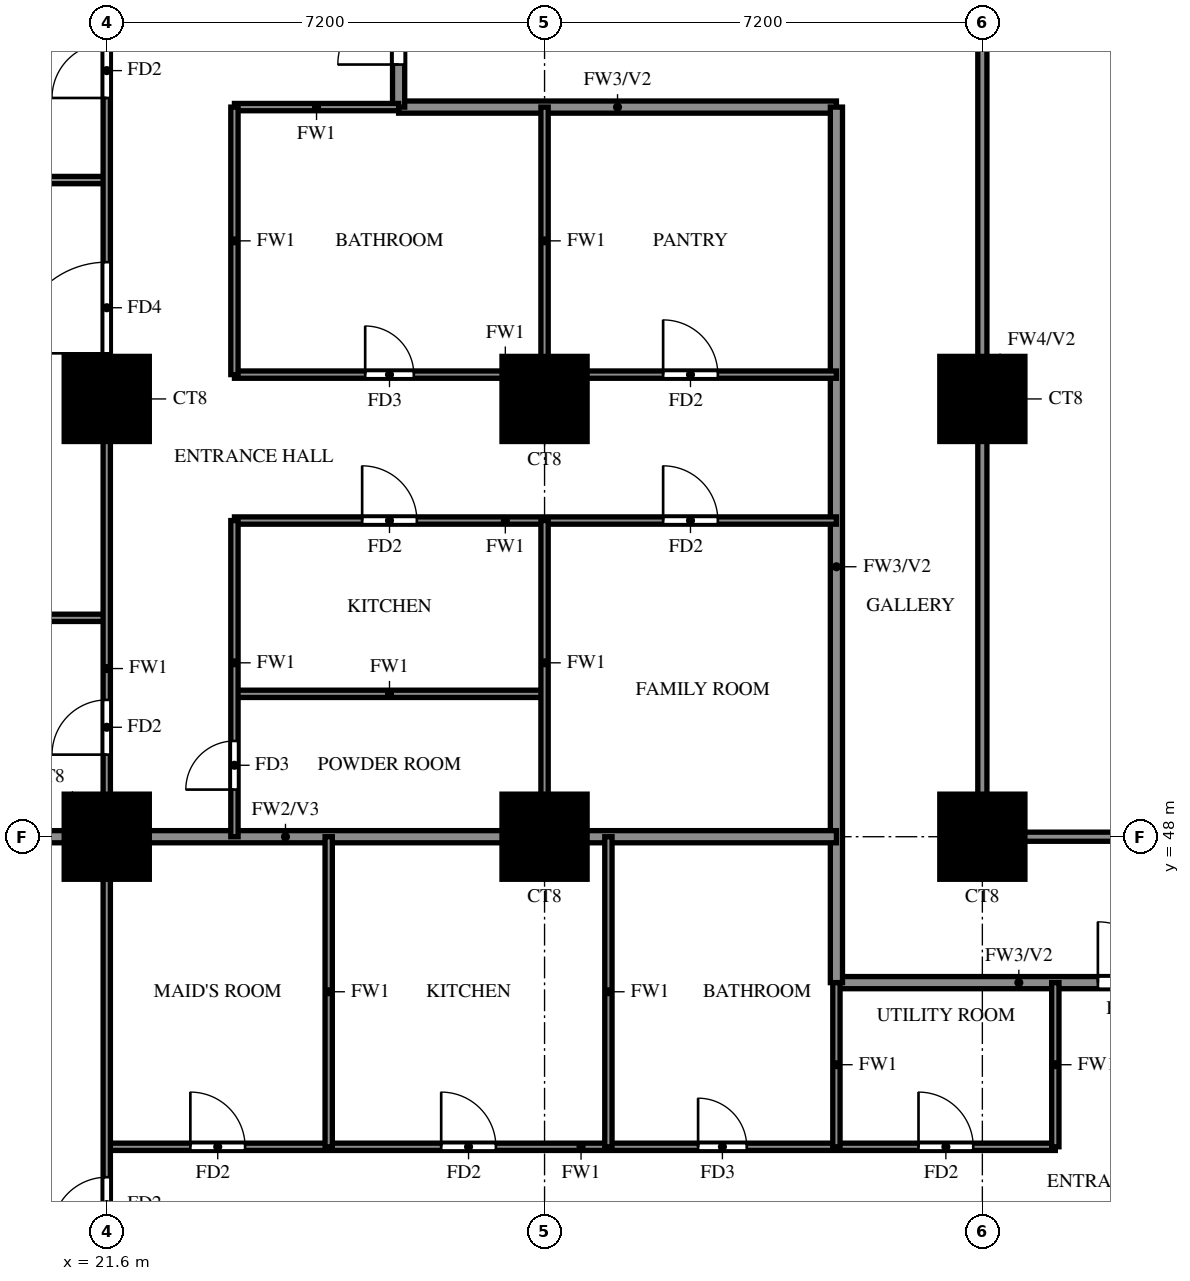
"""IFC4 building model, lengths in metres.
Left out: names, types, materials, properties, quantities, classifications, styles, units other than length and angle.
Written with IfcOpenShell. Run it as: python <this file> out.ifc"""

import sys

from ifc_helpers import new_model, si_unit, direction, frame, frame_2d, origin, origin_2d, place, context, subcontext, project, spatial, rectangle, extrude, source, transform, mapped, element, fill, save


model = new_model("IFC4")
c1 = context("Model", 3, precision=1e-05, world=origin(), true_north=direction((0.0, 1.0)))
c2 = subcontext(c1, "Body", "Model", "MODEL_VIEW")
j1 = project(units=[si_unit("LENGTHUNIT", "METRE"), si_unit("PLANEANGLEUNIT", "RADIAN")], contexts=[c1])
p1 = place(None, origin())
s1 = spatial("IfcSite", under=j1, at=p1, CompositionType="ELEMENT")
p2 = place(p1, origin())
s2 = spatial("IfcBuilding", under=s1, at=p2, CompositionType="ELEMENT")
p3 = place(p2, frame((0.0, 0.0, 30.5)))
s3 = spatial("IfcBuildingStorey", under=s2, at=p3, CompositionType="ELEMENT", Elevation=30.5)
m1 = source(origin(), c2, "Body", "SweptSolid", [
    extrude(rectangle(XDim=1.4, YDim=1.4, at=origin_2d()), origin(), (0.0, 0.0, 1.0), 3.18),
])
for number, where, z_axis, x_axis in (
    (1, (21.6, 48.0, 0.0), (0.0, 0.0, 1.0), (1.0, 0.0, 0.0)),
    (2, (28.8, 48.0, 0.0), (0.0, 0.0, 1.0), (1.0, 0.0, 0.0)),
    (3, (36.0, 48.0, 0.0), (0.0, 0.0, 1.0), (1.0, 0.0, 0.0)),
    (4, (21.6, 55.2, 0.0), (0.0, 0.0, 1.0), (1.0, 0.0, 0.0)),
    (5, (28.8, 55.2, 0.0), (0.0, 0.0, 1.0), (1.0, 0.0, 0.0)),
    (6, (36.0, 55.2, 0.0), (0.0, 0.0, 1.0), (1.0, 0.0, 0.0)),
):
    element("IfcColumn", number, at=place(p3, frame(where, z_axis=z_axis, x_axis=x_axis)), inside=s3, PredefinedType="COLUMN", context=c2, shape_type="MappedRepresentation", body=[
        mapped(m1, transform((0.0, 0.0, 0.0))),
    ])
p4 = place(p3, frame((33.6, 45.6, 0.0), z_axis=(0.0, 0.0, 1.0), x_axis=(1.0, 0.0, 0.0)))
e7 = element("IfcWall", 7, at=p4, inside=s3, PredefinedType="SOLIDWALL", context=c2, shape_type="SweptSolid", body=[
    extrude(rectangle(XDim=6.0, YDim=0.2, at=frame_2d((3.0, 0.0))), origin(), (0.0, 0.0, 1.0), 3.18),
])
p5 = place(p4, frame((4.3, 0.0, 0.0)))
e8 = element("IfcOpeningElement", 8, at=p5, cuts=e7, PredefinedType="OPENING", context=c2, shape_type="SweptSolid", body=[
    extrude(rectangle(XDim=1.0, YDim=2.1, at=frame_2d((0.5, 1.05))), frame((0.0, 0.11, 0.0), z_axis=(0.0, -1.0, 0.0), x_axis=(1.0, 0.0, 0.0)), (0.0, 0.0, 1.0), 0.22),
])
p6 = place(p3, frame((26.4, 60.0, 0.0), z_axis=(0.0, 0.0, 1.0), x_axis=(1.0, 0.0, 0.0)))
e9 = element("IfcWall", 9, at=p6, inside=s3, PredefinedType="SOLIDWALL", context=c2, shape_type="SweptSolid", body=[
    extrude(rectangle(XDim=7.2, YDim=0.2, at=frame_2d((3.6, 0.0))), origin(), (0.0, 0.0, 1.0), 3.18),
])
p7 = place(p3, frame((26.4, 60.0, 0.0), z_axis=(0.0, 0.0, 1.0), x_axis=(0.0, 1.0, 0.0)))
e10 = element("IfcWall", 10, at=p7, inside=s3, PredefinedType="SOLIDWALL", context=c2, shape_type="SweptSolid", body=[
    extrude(rectangle(XDim=9.6, YDim=0.2, at=frame_2d((4.8, 0.0))), origin(), (0.0, 0.0, 1.0), 3.18),
])
p8 = place(p7, frame((0.7, 0.0, 0.0)))
e11 = element("IfcOpeningElement", 11, at=p8, cuts=e10, PredefinedType="OPENING", context=c2, shape_type="SweptSolid", body=[
    extrude(rectangle(XDim=1.0, YDim=2.1, at=frame_2d((0.5, 1.05))), frame((0.0, 0.11, 0.0), z_axis=(0.0, -1.0, 0.0), x_axis=(1.0, 0.0, 0.0)), (0.0, 0.0, 1.0), 0.22),
])
p9 = place(p7, frame((3.1, 0.0, 0.0)))
e12 = element("IfcOpeningElement", 12, at=p9, cuts=e10, PredefinedType="OPENING", context=c2, shape_type="SweptSolid", body=[
    extrude(rectangle(XDim=1.0, YDim=2.1, at=frame_2d((0.5, 1.05))), frame((0.0, 0.11, 0.0), z_axis=(0.0, -1.0, 0.0), x_axis=(1.0, 0.0, 0.0)), (0.0, 0.0, 1.0), 0.22),
])
p10 = place(p3, frame((33.6, 45.6, 0.0), z_axis=(0.0, 0.0, 1.0), x_axis=(0.0, 1.0, 0.0)))
e13 = element("IfcWall", 13, at=p10, inside=s3, PredefinedType="SOLIDWALL", context=c2, shape_type="SweptSolid", body=[
    extrude(rectangle(XDim=14.4, YDim=0.2, at=frame_2d((7.2, 0.0))), origin(), (0.0, 0.0, 1.0), 3.18),
])
p11 = place(p3, frame((14.525, 48.0, 0.0), z_axis=(0.0, 0.0, 1.0), x_axis=(1.0, 0.0, 0.0)))
e14 = element("IfcWall", 14, at=p11, inside=s3, PredefinedType="SOLIDWALL", context=c2, shape_type="SweptSolid", body=[
    extrude(rectangle(XDim=19.075, YDim=0.2, at=frame_2d((9.538, 0.0))), origin(), (0.0, 0.0, 1.0), 3.18),
])
p12 = place(p3, frame((21.6, 42.9, 0.0), z_axis=(0.0, 0.0, 1.0), x_axis=(1.0, 0.0, 0.0)))
e15 = element("IfcWall", 15, at=p12, inside=s3, PredefinedType="PARTITIONING", context=c2, shape_type="SweptSolid", body=[
    extrude(rectangle(XDim=15.6, YDim=0.12, at=frame_2d((7.8, 0.0))), origin(), (0.0, 0.0, 1.0), 3.18),
])
p13 = place(p12, frame((1.375, 0.0, 0.0)))
e16 = element("IfcOpeningElement", 16, at=p13, cuts=e15, PredefinedType="OPENING", context=c2, shape_type="SweptSolid", body=[
    extrude(rectangle(XDim=0.9, YDim=2.1, at=frame_2d((0.45, 1.05))), frame((0.0, 0.07, 0.0), z_axis=(0.0, -1.0, 0.0), x_axis=(1.0, 0.0, 0.0)), (0.0, 0.0, 1.0), 0.14),
])
p14 = place(p12, frame((5.5, 0.0, 0.0)))
e17 = element("IfcOpeningElement", 17, at=p14, cuts=e15, PredefinedType="OPENING", context=c2, shape_type="SweptSolid", body=[
    extrude(rectangle(XDim=0.9, YDim=2.1, at=frame_2d((0.45, 1.05))), frame((0.0, 0.07, 0.0), z_axis=(0.0, -1.0, 0.0), x_axis=(1.0, 0.0, 0.0)), (0.0, 0.0, 1.0), 0.14),
])
p15 = place(p12, frame((9.725, 0.0, 0.0)))
e18 = element("IfcOpeningElement", 18, at=p15, cuts=e15, PredefinedType="OPENING", context=c2, shape_type="SweptSolid", body=[
    extrude(rectangle(XDim=0.8, YDim=2.1, at=frame_2d((0.4, 1.05))), frame((0.0, 0.07, 0.0), z_axis=(0.0, -1.0, 0.0), x_axis=(1.0, 0.0, 0.0)), (0.0, 0.0, 1.0), 0.14),
])
p16 = place(p12, frame((13.35, 0.0, 0.0)))
e19 = element("IfcOpeningElement", 19, at=p16, cuts=e15, PredefinedType="OPENING", context=c2, shape_type="SweptSolid", body=[
    extrude(rectangle(XDim=0.9, YDim=2.1, at=frame_2d((0.45, 1.05))), frame((0.0, 0.07, 0.0), z_axis=(0.0, -1.0, 0.0), x_axis=(1.0, 0.0, 0.0)), (0.0, 0.0, 1.0), 0.14),
])
p17 = place(p3, frame((23.7, 50.35, 0.0), z_axis=(0.0, 0.0, 1.0), x_axis=(1.0, 0.0, 0.0)))
e20 = element("IfcWall", 20, at=p17, inside=s3, PredefinedType="PARTITIONING", context=c2, shape_type="SweptSolid", body=[
    extrude(rectangle(XDim=5.1, YDim=0.12, at=frame_2d((2.55, 0.0))), origin(), (0.0, 0.0, 1.0), 3.18),
])
p18 = place(p3, frame((14.525, 51.6, 0.0), z_axis=(0.0, 0.0, 1.0), x_axis=(1.0, 0.0, 0.0)))
e21 = element("IfcWall", 21, at=p18, inside=s3, PredefinedType="PARTITIONING", context=c2, shape_type="SweptSolid", body=[
    extrude(rectangle(XDim=7.075, YDim=0.12, at=frame_2d((3.538, 0.0))), origin(), (0.0, 0.0, 1.0), 2.28),
])
p19 = place(p3, frame((23.7, 53.2, 0.0), z_axis=(0.0, 0.0, 1.0), x_axis=(1.0, 0.0, 0.0)))
e22 = element("IfcWall", 22, at=p19, inside=s3, PredefinedType="PARTITIONING", context=c2, shape_type="SweptSolid", body=[
    extrude(rectangle(XDim=9.9, YDim=0.12, at=frame_2d((4.95, 0.0))), origin(), (0.0, 0.0, 1.0), 3.18),
])
p20 = place(p19, frame((2.1, 0.0, 0.0)))
e23 = element("IfcOpeningElement", 23, at=p20, cuts=e22, PredefinedType="OPENING", context=c2, shape_type="SweptSolid", body=[
    extrude(rectangle(XDim=0.9, YDim=2.1, at=frame_2d((0.45, 1.05))), frame((0.0, 0.07, 0.0), z_axis=(0.0, -1.0, 0.0), x_axis=(1.0, 0.0, 0.0)), (0.0, 0.0, 1.0), 0.14),
])
p21 = place(p19, frame((7.05, 0.0, 0.0)))
e24 = element("IfcOpeningElement", 24, at=p21, cuts=e22, PredefinedType="OPENING", context=c2, shape_type="SweptSolid", body=[
    extrude(rectangle(XDim=0.9, YDim=2.1, at=frame_2d((0.45, 1.05))), frame((0.0, 0.07, 0.0), z_axis=(0.0, -1.0, 0.0), x_axis=(1.0, 0.0, 0.0)), (0.0, 0.0, 1.0), 0.14),
])
p22 = place(p3, frame((23.7, 55.6, 0.0), z_axis=(0.0, 0.0, 1.0), x_axis=(1.0, 0.0, 0.0)))
e25 = element("IfcWall", 25, at=p22, inside=s3, PredefinedType="PARTITIONING", context=c2, shape_type="SweptSolid", body=[
    extrude(rectangle(XDim=9.9, YDim=0.12, at=frame_2d((4.95, 0.0))), origin(), (0.0, 0.0, 1.0), 3.18),
])
p23 = place(p22, frame((2.15, 0.0, 0.0)))
e26 = element("IfcOpeningElement", 26, at=p23, cuts=e25, PredefinedType="OPENING", context=c2, shape_type="SweptSolid", body=[
    extrude(rectangle(XDim=0.8, YDim=2.1, at=frame_2d((0.4, 1.05))), frame((0.0, 0.07, 0.0), z_axis=(0.0, -1.0, 0.0), x_axis=(1.0, 0.0, 0.0)), (0.0, 0.0, 1.0), 0.14),
])
p24 = place(p22, frame((7.05, 0.0, 0.0)))
e27 = element("IfcOpeningElement", 27, at=p24, cuts=e25, PredefinedType="OPENING", context=c2, shape_type="SweptSolid", body=[
    extrude(rectangle(XDim=0.9, YDim=2.1, at=frame_2d((0.45, 1.05))), frame((0.0, 0.07, 0.0), z_axis=(0.0, -1.0, 0.0), x_axis=(1.0, 0.0, 0.0)), (0.0, 0.0, 1.0), 0.14),
])
p25 = place(p3, frame((14.525, 58.8, 0.0), z_axis=(0.0, 0.0, 1.0), x_axis=(1.0, 0.0, 0.0)))
e28 = element("IfcWall", 28, at=p25, inside=s3, PredefinedType="PARTITIONING", context=c2, shape_type="SweptSolid", body=[
    extrude(rectangle(XDim=7.075, YDim=0.12, at=frame_2d((3.538, 0.0))), origin(), (0.0, 0.0, 1.0), 2.28),
])
p26 = place(p3, frame((23.7, 60.0, 0.0), z_axis=(0.0, 0.0, 1.0), x_axis=(1.0, 0.0, 0.0)))
e29 = element("IfcWall", 29, at=p26, inside=s3, PredefinedType="PARTITIONING", context=c2, shape_type="SweptSolid", body=[
    extrude(rectangle(XDim=2.7, YDim=0.12, at=frame_2d((1.35, 0.0))), origin(), (0.0, 0.0, 1.0), 3.18),
])
p27 = place(p3, frame((21.6, 33.725, 0.0), z_axis=(0.0, 0.0, 1.0), x_axis=(0.0, 1.0, 0.0)))
e30 = element("IfcWall", 30, at=p27, inside=s3, PredefinedType="PARTITIONING", context=c2, shape_type="SweptSolid", body=[
    extrude(rectangle(XDim=35.875, YDim=0.12, at=frame_2d((17.938, 0.0))), origin(), (0.0, 0.0, 1.0), 3.18),
])
p28 = place(p27, frame((7.775, 0.0, 0.0)))
e31 = element("IfcOpeningElement", 31, at=p28, cuts=e30, PredefinedType="OPENING", context=c2, shape_type="SweptSolid", body=[
    extrude(rectangle(XDim=0.9, YDim=2.1, at=frame_2d((0.45, 1.05))), frame((0.0, 0.07, 0.0), z_axis=(0.0, -1.0, 0.0), x_axis=(1.0, 0.0, 0.0)), (0.0, 0.0, 1.0), 0.14),
])
p29 = place(p27, frame((15.625, 0.0, 0.0)))
e32 = element("IfcOpeningElement", 32, at=p29, cuts=e30, PredefinedType="OPENING", context=c2, shape_type="SweptSolid", body=[
    extrude(rectangle(XDim=0.9, YDim=2.1, at=frame_2d((0.45, 1.05))), frame((0.0, 0.07, 0.0), z_axis=(0.0, -1.0, 0.0), x_axis=(1.0, 0.0, 0.0)), (0.0, 0.0, 1.0), 0.14),
])
p30 = place(p27, frame((22.225, 0.0, 0.0)))
e33 = element("IfcOpeningElement", 33, at=p30, cuts=e30, PredefinedType="OPENING", context=c2, shape_type="SweptSolid", body=[
    extrude(rectangle(XDim=1.5, YDim=2.1, at=frame_2d((0.75, 1.05))), frame((0.0, 0.07, 0.0), z_axis=(0.0, -1.0, 0.0), x_axis=(1.0, 0.0, 0.0)), (0.0, 0.0, 1.0), 0.14),
])
p31 = place(p27, frame((26.425, 0.0, 0.0)))
e34 = element("IfcOpeningElement", 34, at=p31, cuts=e30, PredefinedType="OPENING", context=c2, shape_type="SweptSolid", body=[
    extrude(rectangle(XDim=0.9, YDim=2.1, at=frame_2d((0.45, 1.05))), frame((0.0, 0.07, 0.0), z_axis=(0.0, -1.0, 0.0), x_axis=(1.0, 0.0, 0.0)), (0.0, 0.0, 1.0), 0.14),
])
p32 = place(p27, frame((30.025, 0.0, 0.0)))
e35 = element("IfcOpeningElement", 35, at=p32, cuts=e30, PredefinedType="OPENING", context=c2, shape_type="SweptSolid", body=[
    extrude(rectangle(XDim=0.9, YDim=2.1, at=frame_2d((0.45, 1.05))), frame((0.0, 0.07, 0.0), z_axis=(0.0, -1.0, 0.0), x_axis=(1.0, 0.0, 0.0)), (0.0, 0.0, 1.0), 0.14),
])
p33 = place(p27, frame((33.625, 0.0, 0.0)))
e36 = element("IfcOpeningElement", 36, at=p33, cuts=e30, PredefinedType="OPENING", context=c2, shape_type="SweptSolid", body=[
    extrude(rectangle(XDim=0.9, YDim=2.1, at=frame_2d((0.45, 1.05))), frame((0.0, 0.07, 0.0), z_axis=(0.0, -1.0, 0.0), x_axis=(1.0, 0.0, 0.0)), (0.0, 0.0, 1.0), 0.14),
])
p34 = place(p3, frame((23.7, 48.0, 0.0), z_axis=(0.0, 0.0, 1.0), x_axis=(0.0, 1.0, 0.0)))
e37 = element("IfcWall", 37, at=p34, inside=s3, PredefinedType="PARTITIONING", context=c2, shape_type="SweptSolid", body=[
    extrude(rectangle(XDim=5.2, YDim=0.12, at=frame_2d((2.6, 0.0))), origin(), (0.0, 0.0, 1.0), 3.18),
])
p35 = place(p34, frame((0.775, 0.0, 0.0)))
e38 = element("IfcOpeningElement", 38, at=p35, cuts=e37, PredefinedType="OPENING", context=c2, shape_type="SweptSolid", body=[
    extrude(rectangle(XDim=0.8, YDim=2.1, at=frame_2d((0.4, 1.05))), frame((0.0, 0.07, 0.0), z_axis=(0.0, -1.0, 0.0), x_axis=(1.0, 0.0, 0.0)), (0.0, 0.0, 1.0), 0.14),
])
p36 = place(p3, frame((23.7, 55.6, 0.0), z_axis=(0.0, 0.0, 1.0), x_axis=(0.0, 1.0, 0.0)))
e39 = element("IfcWall", 39, at=p36, inside=s3, PredefinedType="PARTITIONING", context=c2, shape_type="SweptSolid", body=[
    extrude(rectangle(XDim=4.4, YDim=0.12, at=frame_2d((2.2, 0.0))), origin(), (0.0, 0.0, 1.0), 3.18),
])
p37 = place(p3, frame((25.25, 42.9, 0.0), z_axis=(0.0, 0.0, 1.0), x_axis=(0.0, 1.0, 0.0)))
e40 = element("IfcWall", 40, at=p37, inside=s3, PredefinedType="PARTITIONING", context=c2, shape_type="SweptSolid", body=[
    extrude(rectangle(XDim=5.1, YDim=0.12, at=frame_2d((2.55, 0.0))), origin(), (0.0, 0.0, 1.0), 3.18),
])
p38 = place(p3, frame((28.8, 48.0, 0.0), z_axis=(0.0, 0.0, 1.0), x_axis=(0.0, 1.0, 0.0)))
e41 = element("IfcWall", 41, at=p38, inside=s3, PredefinedType="PARTITIONING", context=c2, shape_type="SweptSolid", body=[
    extrude(rectangle(XDim=5.2, YDim=0.12, at=frame_2d((2.6, 0.0))), origin(), (0.0, 0.0, 1.0), 3.18),
])
p39 = place(p3, frame((28.8, 55.6, 0.0), z_axis=(0.0, 0.0, 1.0), x_axis=(0.0, 1.0, 0.0)))
e42 = element("IfcWall", 42, at=p39, inside=s3, PredefinedType="PARTITIONING", context=c2, shape_type="SweptSolid", body=[
    extrude(rectangle(XDim=4.4, YDim=0.12, at=frame_2d((2.2, 0.0))), origin(), (0.0, 0.0, 1.0), 3.18),
])
p40 = place(p3, frame((29.85, 42.9, 0.0), z_axis=(0.0, 0.0, 1.0), x_axis=(0.0, 1.0, 0.0)))
e43 = element("IfcWall", 43, at=p40, inside=s3, PredefinedType="PARTITIONING", context=c2, shape_type="SweptSolid", body=[
    extrude(rectangle(XDim=5.1, YDim=0.12, at=frame_2d((2.55, 0.0))), origin(), (0.0, 0.0, 1.0), 3.18),
])
for number, where, z_axis, x_axis in (
    (44, (33.6, 42.9, 0.0), (0.0, 0.0, 1.0), (0.0, 1.0, 0.0)),
    (45, (37.2, 42.9, 0.0), (0.0, 0.0, 1.0), (0.0, 1.0, 0.0)),
):
    element("IfcWall", number, at=place(p3, frame(where, z_axis=z_axis, x_axis=x_axis)), inside=s3, PredefinedType="PARTITIONING", context=c2, shape_type="SweptSolid", body=[
        extrude(rectangle(XDim=2.7, YDim=0.12, at=frame_2d((1.35, 0.0))), origin(), (0.0, 0.0, 1.0), 3.18),
    ])
p41 = place(p3, frame((36.0, 48.0, 0.0), z_axis=(0.0, 0.0, 1.0), x_axis=(1.0, 0.0, 0.0)))
e46 = element("IfcWall", 46, at=p41, inside=s3, PredefinedType="SOLIDWALL", context=c2, shape_type="SweptSolid", body=[
    extrude(rectangle(XDim=7.2, YDim=0.15, at=frame_2d((3.6, 0.0))), origin(), (0.0, 0.0, 1.0), 2.28),
])
p42 = place(p3, frame((36.0, 48.0, 0.0), z_axis=(0.0, 0.0, 1.0), x_axis=(0.0, 1.0, 0.0)))
e47 = element("IfcWall", 47, at=p42, inside=s3, PredefinedType="SOLIDWALL", context=c2, shape_type="SweptSolid", body=[
    extrude(rectangle(XDim=14.4, YDim=0.15, at=frame_2d((7.2, 0.0))), origin(), (0.0, 0.0, 1.0), 2.28),
])
p43 = place(p5, origin())
e48 = element("IfcDoor", 48, at=p43, inside=s3, OperationType="SINGLE_SWING_RIGHT", PredefinedType="DOOR", context=c2, shape_type="SweptSolid", body=[
    extrude(rectangle(XDim=1.0, YDim=2.1, at=frame_2d((0.5, 1.05))), frame((0.0, 0.025, 0.0), z_axis=(0.0, -1.0, 0.0), x_axis=(1.0, 0.0, 0.0)), (0.0, 0.0, 1.0), 0.05),
])
fill(e8, e48)
p44 = place(p28, origin())
e49 = element("IfcDoor", 49, at=p44, inside=s3, OperationType="SINGLE_SWING_RIGHT", PredefinedType="DOOR", context=c2, shape_type="SweptSolid", body=[
    extrude(rectangle(XDim=0.9, YDim=2.1, at=frame_2d((0.45, 1.05))), frame((0.0, 0.025, 0.0), z_axis=(0.0, -1.0, 0.0), x_axis=(1.0, 0.0, 0.0)), (0.0, 0.0, 1.0), 0.05),
])
fill(e31, e49)
p45 = place(p13, origin())
e50 = element("IfcDoor", 50, at=p45, inside=s3, OperationType="SINGLE_SWING_LEFT", PredefinedType="DOOR", context=c2, shape_type="SweptSolid", body=[
    extrude(rectangle(XDim=0.9, YDim=2.1, at=frame_2d((0.45, 1.05))), frame((0.0, 0.025, 0.0), z_axis=(0.0, -1.0, 0.0), x_axis=(1.0, 0.0, 0.0)), (0.0, 0.0, 1.0), 0.05),
])
fill(e16, e50)
p46 = place(p14, origin())
e51 = element("IfcDoor", 51, at=p46, inside=s3, OperationType="SINGLE_SWING_LEFT", PredefinedType="DOOR", context=c2, shape_type="SweptSolid", body=[
    extrude(rectangle(XDim=0.9, YDim=2.1, at=frame_2d((0.45, 1.05))), frame((0.0, 0.025, 0.0), z_axis=(0.0, -1.0, 0.0), x_axis=(1.0, 0.0, 0.0)), (0.0, 0.0, 1.0), 0.05),
])
fill(e17, e51)
p47 = place(p15, origin())
e52 = element("IfcDoor", 52, at=p47, inside=s3, OperationType="SINGLE_SWING_RIGHT", PredefinedType="DOOR", context=c2, shape_type="SweptSolid", body=[
    extrude(rectangle(XDim=0.8, YDim=2.1, at=frame_2d((0.4, 1.05))), frame((0.0, 0.025, 0.0), z_axis=(0.0, -1.0, 0.0), x_axis=(1.0, 0.0, 0.0)), (0.0, 0.0, 1.0), 0.05),
])
fill(e18, e52)
p48 = place(p16, origin())
e53 = element("IfcDoor", 53, at=p48, inside=s3, OperationType="SINGLE_SWING_LEFT", PredefinedType="DOOR", context=c2, shape_type="SweptSolid", body=[
    extrude(rectangle(XDim=0.9, YDim=2.1, at=frame_2d((0.45, 1.05))), frame((0.0, 0.025, 0.0), z_axis=(0.0, -1.0, 0.0), x_axis=(1.0, 0.0, 0.0)), (0.0, 0.0, 1.0), 0.05),
])
fill(e19, e53)
p49 = place(p8, origin())
e54 = element("IfcDoor", 54, at=p49, inside=s3, OperationType="SINGLE_SWING_LEFT", PredefinedType="DOOR", context=c2, shape_type="SweptSolid", body=[
    extrude(rectangle(XDim=1.0, YDim=2.1, at=frame_2d((0.5, 1.05))), frame((0.0, 0.025, 0.0), z_axis=(0.0, -1.0, 0.0), x_axis=(1.0, 0.0, 0.0)), (0.0, 0.0, 1.0), 0.05),
])
fill(e11, e54)
p50 = place(p29, origin())
e55 = element("IfcDoor", 55, at=p50, inside=s3, OperationType="SINGLE_SWING_RIGHT", PredefinedType="DOOR", context=c2, shape_type="SweptSolid", body=[
    extrude(rectangle(XDim=0.9, YDim=2.1, at=frame_2d((0.45, 1.05))), frame((0.0, 0.025, 0.0), z_axis=(0.0, -1.0, 0.0), x_axis=(1.0, 0.0, 0.0)), (0.0, 0.0, 1.0), 0.05),
])
fill(e32, e55)
p51 = place(p30, origin())
e56 = element("IfcDoor", 56, at=p51, inside=s3, OperationType="SINGLE_SWING_RIGHT", PredefinedType="DOOR", context=c2, shape_type="SweptSolid", body=[
    extrude(rectangle(XDim=1.5, YDim=2.1, at=frame_2d((0.75, 1.05))), frame((0.0, 0.025, 0.0), z_axis=(0.0, -1.0, 0.0), x_axis=(1.0, 0.0, 0.0)), (0.0, 0.0, 1.0), 0.05),
])
fill(e33, e56)
p52 = place(p31, origin())
e57 = element("IfcDoor", 57, at=p52, inside=s3, OperationType="SINGLE_SWING_LEFT", PredefinedType="DOOR", context=c2, shape_type="SweptSolid", body=[
    extrude(rectangle(XDim=0.9, YDim=2.1, at=frame_2d((0.45, 1.05))), frame((0.0, 0.025, 0.0), z_axis=(0.0, -1.0, 0.0), x_axis=(1.0, 0.0, 0.0)), (0.0, 0.0, 1.0), 0.05),
])
fill(e34, e57)
p53 = place(p35, origin())
e58 = element("IfcDoor", 58, at=p53, inside=s3, OperationType="SINGLE_SWING_RIGHT", PredefinedType="DOOR", context=c2, shape_type="SweptSolid", body=[
    extrude(rectangle(XDim=0.8, YDim=2.1, at=frame_2d((0.4, 1.05))), frame((0.0, 0.025, 0.0), z_axis=(0.0, -1.0, 0.0), x_axis=(1.0, 0.0, 0.0)), (0.0, 0.0, 1.0), 0.05),
])
fill(e38, e58)
p54 = place(p20, origin())
e59 = element("IfcDoor", 59, at=p54, inside=s3, OperationType="SINGLE_SWING_LEFT", PredefinedType="DOOR", context=c2, shape_type="SweptSolid", body=[
    extrude(rectangle(XDim=0.9, YDim=2.1, at=frame_2d((0.45, 1.05))), frame((0.0, 0.025, 0.0), z_axis=(0.0, -1.0, 0.0), x_axis=(1.0, 0.0, 0.0)), (0.0, 0.0, 1.0), 0.05),
])
fill(e23, e59)
p55 = place(p23, origin())
e60 = element("IfcDoor", 60, at=p55, inside=s3, OperationType="SINGLE_SWING_LEFT", PredefinedType="DOOR", context=c2, shape_type="SweptSolid", body=[
    extrude(rectangle(XDim=0.8, YDim=2.1, at=frame_2d((0.4, 1.05))), frame((0.0, 0.025, 0.0), z_axis=(0.0, -1.0, 0.0), x_axis=(1.0, 0.0, 0.0)), (0.0, 0.0, 1.0), 0.05),
])
fill(e26, e60)
p56 = place(p21, origin())
e61 = element("IfcDoor", 61, at=p56, inside=s3, OperationType="SINGLE_SWING_RIGHT", PredefinedType="DOOR", context=c2, shape_type="SweptSolid", body=[
    extrude(rectangle(XDim=0.9, YDim=2.1, at=frame_2d((0.45, 1.05))), frame((0.0, 0.025, 0.0), z_axis=(0.0, -1.0, 0.0), x_axis=(1.0, 0.0, 0.0)), (0.0, 0.0, 1.0), 0.05),
])
fill(e24, e61)
p57 = place(p24, origin())
e62 = element("IfcDoor", 62, at=p57, inside=s3, OperationType="SINGLE_SWING_LEFT", PredefinedType="DOOR", context=c2, shape_type="SweptSolid", body=[
    extrude(rectangle(XDim=0.9, YDim=2.1, at=frame_2d((0.45, 1.05))), frame((0.0, 0.025, 0.0), z_axis=(0.0, -1.0, 0.0), x_axis=(1.0, 0.0, 0.0)), (0.0, 0.0, 1.0), 0.05),
])
fill(e27, e62)
save(model, sys.argv[1])
